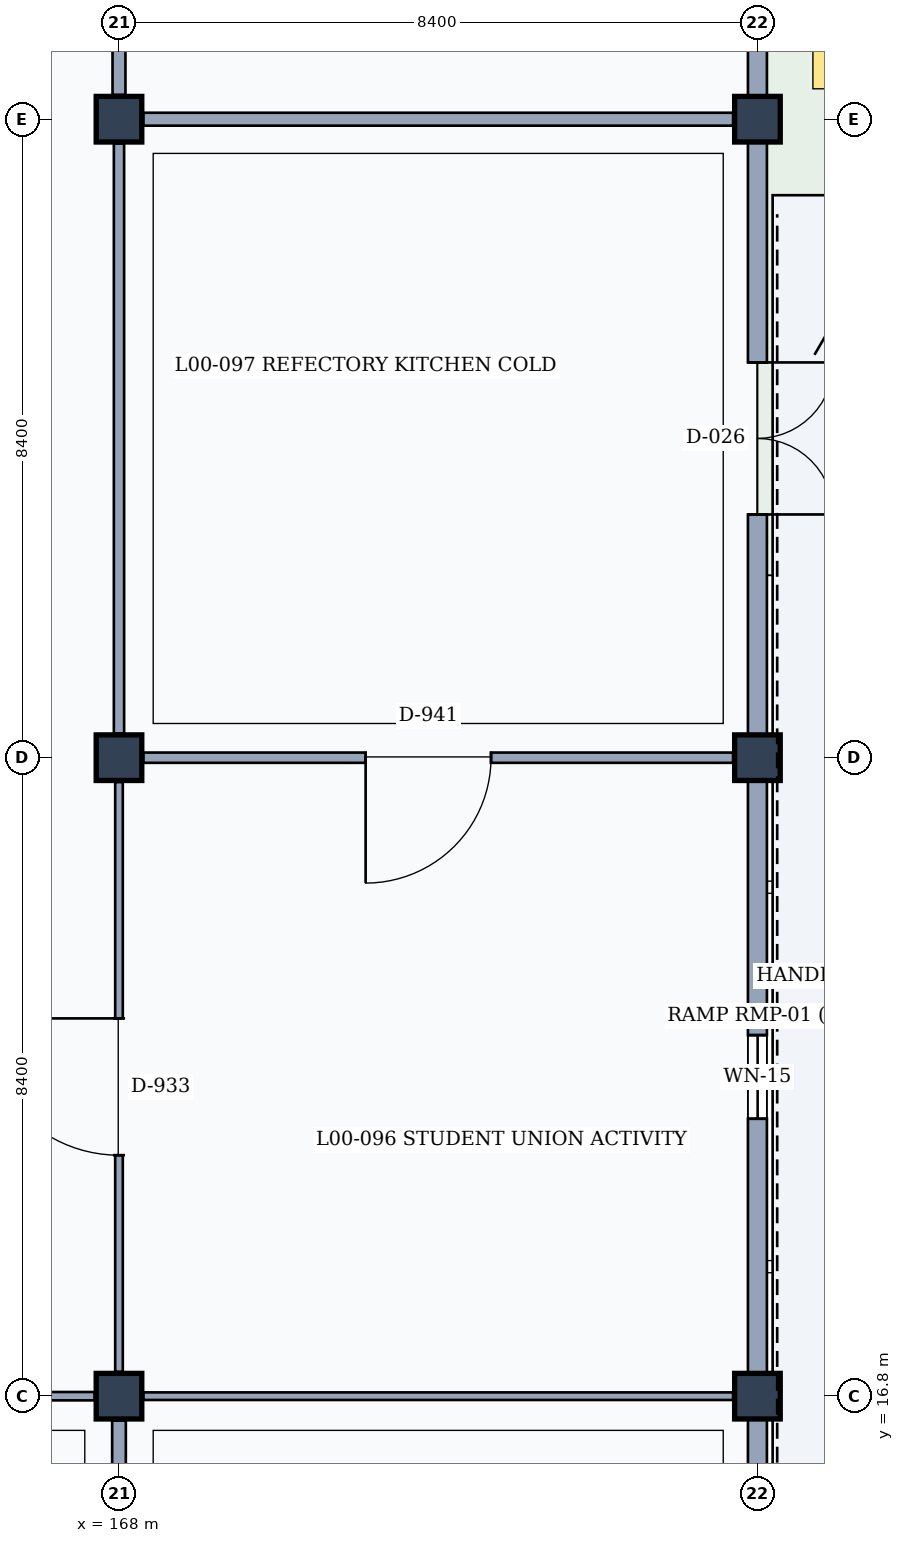
"""IFC4 building model, lengths in metres.
Left out: names, types, materials, properties, quantities, classifications, styles, units other than length and angle.
Written with IfcOpenShell. Run it as: python <this file> out.ifc"""

import sys

from ifc_helpers import new_model, si_unit, direction, frame, frame_2d, origin, origin_2d, place, context, subcontext, project, spatial, rectangle, extrude, element, fill, save


model = new_model("IFC4")
c1 = context("Model", 3, precision=1e-05, world=origin(), true_north=direction((0.0, 1.0)))
c2 = subcontext(c1, "Body", "Model", "MODEL_VIEW")
j1 = project(units=[si_unit("LENGTHUNIT", "METRE"), si_unit("PLANEANGLEUNIT", "RADIAN")], contexts=[c1])
p1 = place(None, origin())
s1 = spatial("IfcSite", under=j1, at=p1, CompositionType="ELEMENT")
p2 = place(p1, origin())
s2 = spatial("IfcBuilding", under=s1, at=p2, CompositionType="ELEMENT")
p3 = place(p2, origin())
s3 = spatial("IfcBuildingStorey", under=s2, at=p3, CompositionType="ELEMENT", Elevation=0.0)
for number, where, z_axis, x_axis in (
    (1, (168.0, 16.8, 0.0), (0.0, 0.0, 1.0), (1.0, 0.0, 0.0)),
    (2, (168.0, 25.2, 0.0), (0.0, 0.0, 1.0), (1.0, 0.0, 0.0)),
    (3, (168.0, 33.6, 0.0), (0.0, 0.0, 1.0), (1.0, 0.0, 0.0)),
    (4, (176.4, 16.8, 0.0), (0.0, 0.0, 1.0), (1.0, 0.0, 0.0)),
    (5, (176.4, 25.2, 0.0), (0.0, 0.0, 1.0), (1.0, 0.0, 0.0)),
    (6, (176.4, 33.6, 0.0), (0.0, 0.0, 1.0), (1.0, 0.0, 0.0)),
):
    element("IfcColumn", number, at=place(p3, frame(where, z_axis=z_axis, x_axis=x_axis)), inside=s3, PredefinedType="COLUMN", context=c2, shape_type="SweptSolid", body=[
        extrude(rectangle(XDim=0.6, YDim=0.6, at=origin_2d()), origin(), (0.0, 0.0, 1.0), 4.8),
    ])
p4 = place(p3, frame((176.4, 16.5, 0.0), z_axis=(0.0, 0.0, 1.0), x_axis=(0.0, -1.0, 0.0)))
e7 = element("IfcWall", 7, at=p4, inside=s3, PredefinedType="SOLIDWALL", context=c2, shape_type="SweptSolid", body=[
    extrude(rectangle(XDim=7.8, YDim=0.25, at=frame_2d((3.9, 0.0))), origin(), (0.0, 0.0, 1.0), 3.96),
])
p5 = place(p4, frame((2.4, 0.0, 0.95)))
e8 = element("IfcOpeningElement", 8, at=p5, cuts=e7, PredefinedType="OPENING", context=c2, shape_type="SweptSolid", body=[
    extrude(rectangle(XDim=3.0, YDim=1.8, at=frame_2d((1.5, 0.9))), frame((0.0, 0.135, 0.0), z_axis=(0.0, -1.0, 0.0), x_axis=(1.0, 0.0, 0.0)), (0.0, 0.0, 1.0), 0.27),
])
p6 = place(p3, frame((176.4, 24.9, 0.0), z_axis=(0.0, 0.0, 1.0), x_axis=(0.0, -1.0, 0.0)))
e9 = element("IfcWall", 9, at=p6, inside=s3, PredefinedType="SOLIDWALL", context=c2, shape_type="SweptSolid", body=[
    extrude(rectangle(XDim=7.8, YDim=0.25, at=frame_2d((3.9, 0.0))), origin(), (0.0, 0.0, 1.0), 3.96),
])
p7 = place(p6, frame((3.35, 0.0, 0.95)))
e10 = element("IfcOpeningElement", 10, at=p7, cuts=e9, PredefinedType="OPENING", context=c2, shape_type="SweptSolid", body=[
    extrude(rectangle(XDim=1.1, YDim=1.95, at=frame_2d((0.55, 0.975))), frame((0.0, 0.135, 0.0), z_axis=(0.0, -1.0, 0.0), x_axis=(1.0, 0.0, 0.0)), (0.0, 0.0, 1.0), 0.27),
])
p8 = place(p3, frame((176.4, 33.3, 0.0), z_axis=(0.0, 0.0, 1.0), x_axis=(0.0, -1.0, 0.0)))
e11 = element("IfcWall", 11, at=p8, inside=s3, PredefinedType="SOLIDWALL", context=c2, shape_type="SweptSolid", body=[
    extrude(rectangle(XDim=7.8, YDim=0.25, at=frame_2d((3.9, 0.0))), origin(), (0.0, 0.0, 1.0), 3.96),
])
p9 = place(p8, frame((2.9, 0.0, 0.0)))
e12 = element("IfcOpeningElement", 12, at=p9, cuts=e11, PredefinedType="OPENING", context=c2, shape_type="SweptSolid", body=[
    extrude(rectangle(XDim=2.0, YDim=2.3, at=frame_2d((1.0, 1.15))), frame((0.0, 0.135, 0.0), z_axis=(0.0, -1.0, 0.0), x_axis=(1.0, 0.0, 0.0)), (0.0, 0.0, 1.0), 0.27),
])
p10 = place(p3, frame((176.4, 41.7, 0.0), z_axis=(0.0, 0.0, 1.0), x_axis=(0.0, -1.0, 0.0)))
e13 = element("IfcWall", 13, at=p10, inside=s3, PredefinedType="SOLIDWALL", context=c2, shape_type="SweptSolid", body=[
    extrude(rectangle(XDim=7.8, YDim=0.25, at=frame_2d((3.9, 0.0))), origin(), (0.0, 0.0, 1.0), 3.96),
])
p11 = place(p10, frame((3.3, 0.0, 0.95)))
e14 = element("IfcOpeningElement", 14, at=p11, cuts=e13, PredefinedType="OPENING", context=c2, shape_type="SweptSolid", body=[
    extrude(rectangle(XDim=1.2, YDim=1.8, at=frame_2d((0.6, 0.9))), frame((0.0, 0.135, 0.0), z_axis=(0.0, -1.0, 0.0), x_axis=(1.0, 0.0, 0.0)), (0.0, 0.0, 1.0), 0.27),
])
p12 = place(p3, frame((168.0, 8.72, 0.0), z_axis=(0.0, 0.0, 1.0), x_axis=(0.0, 1.0, 0.0)))
e15 = element("IfcWall", 15, at=p12, inside=s3, PredefinedType="PARTITIONING", context=c2, shape_type="SweptSolid", body=[
    extrude(rectangle(XDim=7.76, YDim=0.18, at=frame_2d((3.88, 0.0))), origin(), (0.0, 0.0, 1.0), 3.92),
])
p13 = place(p12, frame((3.125, 0.0, 0.0)))
e16 = element("IfcOpeningElement", 16, at=p13, cuts=e15, PredefinedType="OPENING", context=c2, shape_type="SweptSolid", body=[
    extrude(rectangle(XDim=1.25, YDim=2.3, at=frame_2d((0.625, 1.15))), frame((0.0, 0.1, 0.0), z_axis=(0.0, -1.0, 0.0), x_axis=(1.0, 0.0, 0.0)), (0.0, 0.0, 1.0), 0.2),
])
p14 = place(p3, frame((159.92, 16.8, 0.0), z_axis=(0.0, 0.0, 1.0), x_axis=(1.0, 0.0, 0.0)))
e17 = element("IfcWall", 17, at=p14, inside=s3, PredefinedType="PARTITIONING", context=c2, shape_type="SweptSolid", body=[
    extrude(rectangle(XDim=7.76, YDim=0.11, at=frame_2d((3.88, 0.0))), origin(), (0.0, 0.0, 1.0), 3.85),
])
p15 = place(p3, frame((168.0, 17.12, 0.0), z_axis=(0.0, 0.0, 1.0), x_axis=(0.0, 1.0, 0.0)))
e18 = element("IfcWall", 18, at=p15, inside=s3, PredefinedType="MOVABLE", context=c2, shape_type="SweptSolid", body=[
    extrude(rectangle(XDim=7.76, YDim=0.1, at=frame_2d((3.88, 0.0))), origin(), (0.0, 0.0, 1.0), 3.92),
])
p16 = place(p15, frame((2.85, 0.0, 0.0)))
e19 = element("IfcOpeningElement", 19, at=p16, cuts=e18, PredefinedType="OPENING", context=c2, shape_type="SweptSolid", body=[
    extrude(rectangle(XDim=1.8, YDim=2.3, at=frame_2d((0.9, 1.15))), frame((0.0, 0.06, 0.0), z_axis=(0.0, -1.0, 0.0), x_axis=(1.0, 0.0, 0.0)), (0.0, 0.0, 1.0), 0.12),
])
p17 = place(p3, frame((168.0, 25.52, 0.0), z_axis=(0.0, 0.0, 1.0), x_axis=(0.0, 1.0, 0.0)))
e20 = element("IfcWall", 20, at=p17, inside=s3, PredefinedType="PARTITIONING", context=c2, shape_type="SweptSolid", body=[
    extrude(rectangle(XDim=7.76, YDim=0.135, at=frame_2d((3.88, 0.0))), origin(), (0.0, 0.0, 1.0), 3.92),
])
p18 = place(p3, frame((168.0, 33.92, 0.0), z_axis=(0.0, 0.0, 1.0), x_axis=(0.0, 1.0, 0.0)))
e21 = element("IfcWall", 21, at=p18, inside=s3, PredefinedType="PARTITIONING", context=c2, shape_type="SweptSolid", body=[
    extrude(rectangle(XDim=7.76, YDim=0.17, at=frame_2d((3.88, 0.0))), origin(), (0.0, 0.0, 1.0), 3.92),
])
p19 = place(p3, frame((168.32, 16.8, 0.0), z_axis=(0.0, 0.0, 1.0), x_axis=(1.0, 0.0, 0.0)))
e22 = element("IfcWall", 22, at=p19, inside=s3, PredefinedType="MOVABLE", context=c2, shape_type="SweptSolid", body=[
    extrude(rectangle(XDim=7.76, YDim=0.1, at=frame_2d((3.88, 0.0))), origin(), (0.0, 0.0, 1.0), 3.85),
])
p20 = place(p3, frame((168.32, 25.2, 0.0), z_axis=(0.0, 0.0, 1.0), x_axis=(1.0, 0.0, 0.0)))
e23 = element("IfcWall", 23, at=p20, inside=s3, PredefinedType="PARTITIONING", context=c2, shape_type="SweptSolid", body=[
    extrude(rectangle(XDim=7.76, YDim=0.135, at=frame_2d((3.88, 0.0))), origin(), (0.0, 0.0, 1.0), 3.85),
])
p21 = place(p20, frame((2.925, 0.0, 0.0)))
e24 = element("IfcOpeningElement", 24, at=p21, cuts=e23, PredefinedType="OPENING", context=c2, shape_type="SweptSolid", body=[
    extrude(rectangle(XDim=1.65, YDim=2.25, at=frame_2d((0.825, 1.125))), frame((0.0, 0.077, 0.0), z_axis=(0.0, -1.0, 0.0), x_axis=(1.0, 0.0, 0.0)), (0.0, 0.0, 1.0), 0.155),
])
p22 = place(p3, frame((168.32, 33.6, 0.0), z_axis=(0.0, 0.0, 1.0), x_axis=(1.0, 0.0, 0.0)))
e25 = element("IfcWall", 25, at=p22, inside=s3, PredefinedType="PARTITIONING", context=c2, shape_type="SweptSolid", body=[
    extrude(rectangle(XDim=7.76, YDim=0.17, at=frame_2d((3.88, 0.0))), origin(), (0.0, 0.0, 1.0), 3.87),
])
p23 = place(p7, origin())
e26 = element("IfcWindow", 26, at=p23, inside=s3, PartitioningType="SINGLE_PANEL", PredefinedType="WINDOW", context=c2, shape_type="SweptSolid", body=[
    extrude(rectangle(XDim=1.1, YDim=1.95, at=frame_2d((0.55, 0.975))), frame((0.0, 0.03, 0.0), z_axis=(0.0, -1.0, 0.0), x_axis=(1.0, 0.0, 0.0)), (0.0, 0.0, 1.0), 0.06),
])
fill(e10, e26)
p24 = place(p9, origin())
e27 = element("IfcDoor", 27, at=p24, inside=s3, OperationType="DOUBLE_DOOR_SINGLE_SWING", PredefinedType="DOOR", context=c2, shape_type="SweptSolid", body=[
    extrude(rectangle(XDim=2.0, YDim=2.3, at=frame_2d((1.0, 1.15))), frame((0.0, 0.025, 0.0), z_axis=(0.0, -1.0, 0.0), x_axis=(1.0, 0.0, 0.0)), (0.0, 0.0, 1.0), 0.05),
])
fill(e12, e27)
p25 = place(p16, origin())
e28 = element("IfcDoor", 28, at=p25, inside=s3, OperationType="SINGLE_SWING_RIGHT", PredefinedType="DOOR", context=c2, shape_type="SweptSolid", body=[
    extrude(rectangle(XDim=1.8, YDim=2.3, at=frame_2d((0.9, 1.15))), frame((0.0, 0.025, 0.0), z_axis=(0.0, -1.0, 0.0), x_axis=(1.0, 0.0, 0.0)), (0.0, 0.0, 1.0), 0.05),
])
fill(e19, e28)
p26 = place(p21, frame((1.65, 0.0, 0.0), z_axis=(0.0, 0.0, 1.0), x_axis=(-1.0, 0.0, 0.0)))
e29 = element("IfcDoor", 29, at=p26, inside=s3, OperationType="SINGLE_SWING_RIGHT", PredefinedType="DOOR", context=c2, shape_type="SweptSolid", body=[
    extrude(rectangle(XDim=1.65, YDim=2.25, at=frame_2d((0.825, 1.125))), frame((0.0, 0.025, 0.0), z_axis=(0.0, -1.0, 0.0), x_axis=(1.0, 0.0, 0.0)), (0.0, 0.0, 1.0), 0.05),
])
fill(e24, e29)
save(model, sys.argv[1])
